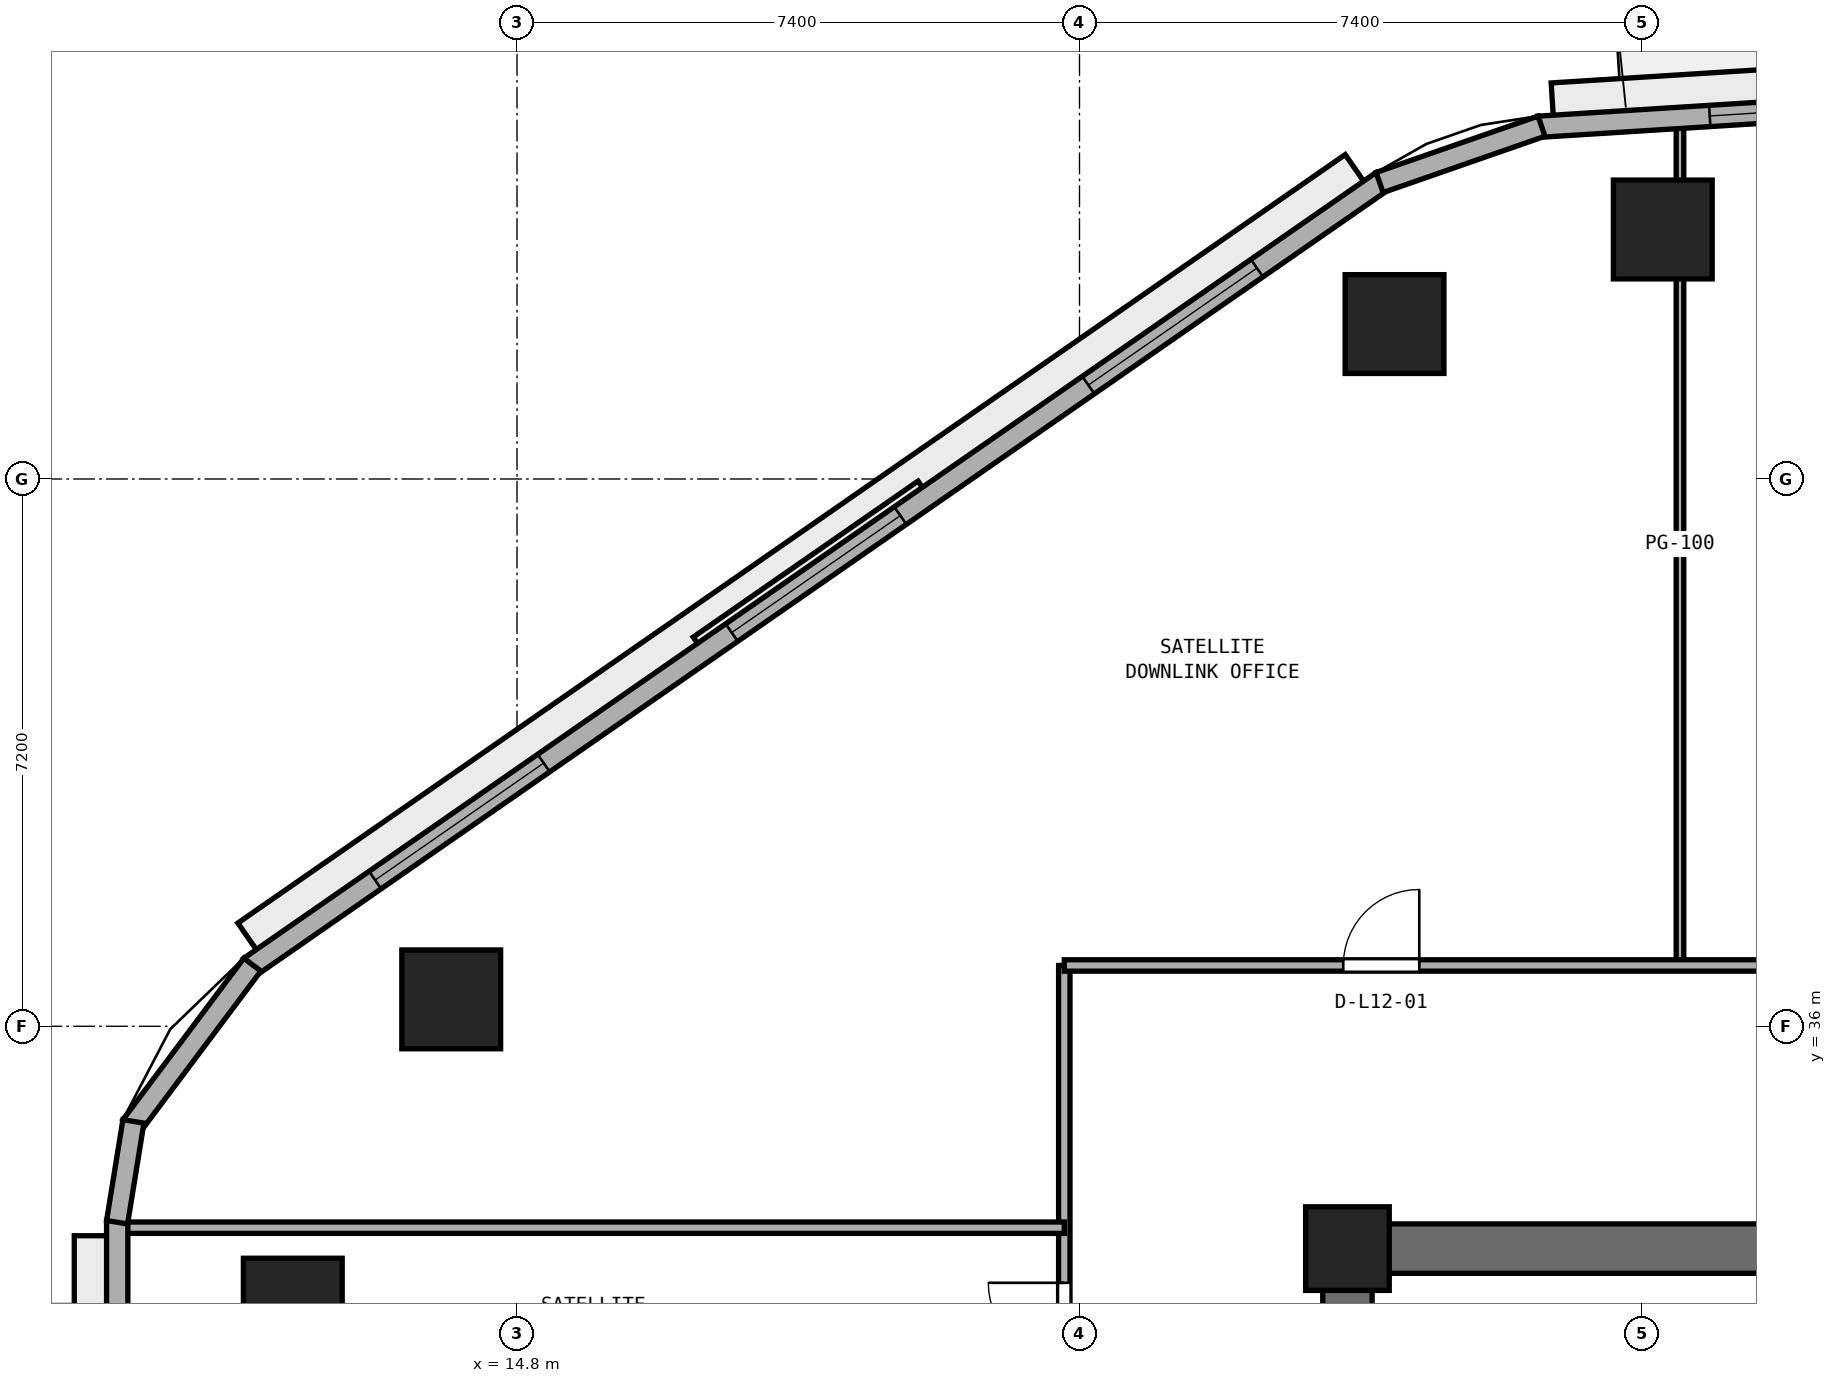
"""IFC4 building model, lengths in metres.
Left out: names, types, materials, properties, quantities, classifications, styles, units other than length and angle.
Written with IfcOpenShell. Run it as: python <this file> out.ifc"""

import sys

from ifc_helpers import new_model, si_unit, direction, frame, frame_2d, origin, origin_2d, place, context, subcontext, project, spatial, rectangle, extrude, element, fill, save


model = new_model("IFC4")
c1 = context("Model", 3, precision=1e-05, world=origin(), true_north=direction((0.0, 1.0)))
c2 = subcontext(c1, "Body", "Model", "MODEL_VIEW")
j1 = project(units=[si_unit("LENGTHUNIT", "METRE"), si_unit("PLANEANGLEUNIT", "RADIAN")], contexts=[c1])
p1 = place(None, origin())
s1 = spatial("IfcSite", under=j1, at=p1, CompositionType="ELEMENT")
p2 = place(p1, origin())
s2 = spatial("IfcBuilding", under=s1, at=p2, CompositionType="ELEMENT")
p3 = place(p2, frame((0.0, 0.0, 51.6)))
s3 = spatial("IfcBuildingStorey", under=s2, at=p3, CompositionType="ELEMENT", Elevation=51.6)
p4 = place(p3, frame((25.4, 33.075, 0.0), z_axis=(0.0, 0.0, 1.0), x_axis=(1.0, 0.0, 0.0)))
e1 = element("IfcWall", 1, at=p4, inside=s3, PredefinedType="SHEAR", context=c2, shape_type="SweptSolid", body=[
    extrude(rectangle(XDim=23.2, YDim=0.65, at=frame_2d((11.6, 0.0))), origin(), (0.0, 0.0, 1.0), 3.525),
])
p5 = place(p3, frame((25.725, 17.65, 0.0), z_axis=(0.0, 0.0, 1.0), x_axis=(0.0, 1.0, 0.0)))
e2 = element("IfcWall", 2, at=p5, inside=s3, PredefinedType="SHEAR", context=c2, shape_type="SweptSolid", body=[
    extrude(rectangle(XDim=15.1, YDim=0.65, at=frame_2d((7.55, 0.0))), origin(), (0.0, 0.0, 1.0), 3.525),
])
p6 = place(p5, frame((6.8, 0.0, 0.0)))
e3 = element("IfcOpeningElement", 3, at=p6, cuts=e2, PredefinedType="OPENING", context=c2, shape_type="SweptSolid", body=[
    extrude(rectangle(XDim=1.5, YDim=2.15, at=frame_2d((0.75, 1.075))), frame((0.0, 0.335, 0.0), z_axis=(0.0, -1.0, 0.0), x_axis=(1.0, 0.0, 0.0)), (0.0, 0.0, 1.0), 0.67),
])
p7 = place(p3, frame((25.725, 33.075, 0.0), z_axis=(0.0, 0.0, 1.0), x_axis=(1.0, 0.0, 0.0)))
e4 = element("IfcColumn", 4, at=p7, inside=s3, PredefinedType="PILASTER", context=c2, shape_type="SweptSolid", body=[
    extrude(rectangle(XDim=1.1, YDim=1.1, at=origin_2d()), origin(), (0.0, 0.0, 1.0), 3.8),
])
for number, where, z_axis, x_axis in (
    (5, (29.874, 46.482, 0.0), (0.0, 0.0, 1.0), (1.0, 0.0, 0.0)),
    (6, (26.344, 45.238, 0.0), (0.0, 0.0, 1.0), (1.0, 0.0, 0.0)),
    (7, (13.934, 36.354, 0.0), (0.0, 0.0, 1.0), (1.0, 0.0, 0.0)),
    (8, (11.85, 32.298, 0.0), (0.0, 0.0, 1.0), (1.0, 0.0, 0.0)),
):
    element("IfcColumn", number, at=place(p3, frame(where, z_axis=z_axis, x_axis=x_axis)), inside=s3, PredefinedType="COLUMN", context=c2, shape_type="SweptSolid", body=[
        extrude(rectangle(XDim=1.3, YDim=1.3, at=origin_2d()), origin(), (0.0, 0.0, 1.0), 3.8),
    ])
p8 = place(p3, frame((30.1, 36.8, 0.0), z_axis=(0.0, 0.0, 1.0), x_axis=(0.0, 1.0, 0.0)))
e9 = element("IfcWall", 9, at=p8, inside=s3, PredefinedType="PARTITIONING", context=c2, shape_type="SweptSolid", body=[
    extrude(rectangle(XDim=11.086, YDim=0.1, at=frame_2d((5.543, 0.0))), origin(), (0.0, 0.0, 1.0), 3.525),
])
p9 = place(p3, frame((22.0, 5.894, 0.0), z_axis=(0.0, 0.0, 1.0), x_axis=(0.0, 1.0, 0.0)))
e10 = element("IfcWall", 10, at=p9, inside=s3, PredefinedType="PARTITIONING", context=c2, shape_type="SweptSolid", body=[
    extrude(rectangle(XDim=30.906, YDim=0.15, at=frame_2d((15.453, 0.0))), origin(), (0.0, 0.0, 1.0), 3.525),
])
p10 = place(p9, frame((12.156, 0.0, 0.0)))
e11 = element("IfcOpeningElement", 11, at=p10, cuts=e10, PredefinedType="OPENING", context=c2, shape_type="SweptSolid", body=[
    extrude(rectangle(XDim=0.9, YDim=2.1, at=frame_2d((0.45, 1.05))), frame((0.0, 0.085, 0.0), z_axis=(0.0, -1.0, 0.0), x_axis=(1.0, 0.0, 0.0)), (0.0, 0.0, 1.0), 0.17),
])
p11 = place(p9, frame((20.806, 0.0, 0.0)))
e12 = element("IfcOpeningElement", 12, at=p11, cuts=e10, PredefinedType="OPENING", context=c2, shape_type="SweptSolid", body=[
    extrude(rectangle(XDim=0.9, YDim=2.1, at=frame_2d((0.45, 1.05))), frame((0.0, 0.085, 0.0), z_axis=(0.0, -1.0, 0.0), x_axis=(1.0, 0.0, 0.0)), (0.0, 0.0, 1.0), 0.17),
])
p12 = place(p9, frame((25.731, 0.0, 0.0)))
e13 = element("IfcOpeningElement", 13, at=p12, cuts=e10, PredefinedType="OPENING", context=c2, shape_type="SweptSolid", body=[
    extrude(rectangle(XDim=1.0, YDim=2.12, at=frame_2d((0.5, 1.06))), frame((0.0, 0.085, 0.0), z_axis=(0.0, -1.0, 0.0), x_axis=(1.0, 0.0, 0.0)), (0.0, 0.0, 1.0), 0.17),
])
p13 = place(p3, frame((9.605, 33.35, 0.0), z_axis=(0.0, 0.0, 1.0), x_axis=(1.0, 0.0, 0.0)))
e14 = element("IfcWall", 14, at=p13, inside=s3, PredefinedType="PARTITIONING", context=c2, shape_type="SweptSolid", body=[
    extrude(rectangle(XDim=12.395, YDim=0.15, at=frame_2d((6.198, 0.0))), origin(), (0.0, 0.0, 1.0), 3.525),
])
p14 = place(p3, frame((22.0, 36.8, 0.0), z_axis=(0.0, 0.0, 1.0), x_axis=(1.0, 0.0, 0.0)))
e15 = element("IfcWall", 15, at=p14, inside=s3, PredefinedType="PARTITIONING", context=c2, shape_type="SweptSolid", body=[
    extrude(rectangle(XDim=30.0, YDim=0.15, at=frame_2d((15.0, 0.0))), origin(), (0.0, 0.0, 1.0), 3.525),
])
p15 = place(p14, frame((3.67, 0.0, 0.0)))
e16 = element("IfcOpeningElement", 16, at=p15, cuts=e15, PredefinedType="OPENING", context=c2, shape_type="SweptSolid", body=[
    extrude(rectangle(XDim=1.0, YDim=2.12, at=frame_2d((0.5, 1.06))), frame((0.0, 0.085, 0.0), z_axis=(0.0, -1.0, 0.0), x_axis=(1.0, 0.0, 0.0)), (0.0, 0.0, 1.0), 0.17),
])
p16 = place(p14, frame((11.9, 0.0, 0.0)))
e17 = element("IfcOpeningElement", 17, at=p16, cuts=e15, PredefinedType="OPENING", context=c2, shape_type="SweptSolid", body=[
    extrude(rectangle(XDim=1.0, YDim=2.12, at=frame_2d((0.5, 1.06))), frame((0.0, 0.085, 0.0), z_axis=(0.0, -1.0, 0.0), x_axis=(1.0, 0.0, 0.0)), (0.0, 0.0, 1.0), 0.17),
])
p17 = place(p14, frame((20.4, 0.0, 0.0)))
e18 = element("IfcOpeningElement", 18, at=p17, cuts=e15, PredefinedType="OPENING", context=c2, shape_type="SweptSolid", body=[
    extrude(rectangle(XDim=1.0, YDim=2.12, at=frame_2d((0.5, 1.06))), frame((0.0, 0.085, 0.0), z_axis=(0.0, -1.0, 0.0), x_axis=(1.0, 0.0, 0.0)), (0.0, 0.0, 1.0), 0.17),
])
p18 = place(p14, frame((26.93, 0.0, 0.0)))
e19 = element("IfcOpeningElement", 19, at=p18, cuts=e15, PredefinedType="OPENING", context=c2, shape_type="SweptSolid", body=[
    extrude(rectangle(XDim=1.0, YDim=2.12, at=frame_2d((0.5, 1.06))), frame((0.0, 0.085, 0.0), z_axis=(0.0, -1.0, 0.0), x_axis=(1.0, 0.0, 0.0)), (0.0, 0.0, 1.0), 0.17),
])
p19 = place(p3, frame((47.832, 49.069, 0.0), z_axis=(0.0, 0.0, 1.0), x_axis=(-0.998017725054, -0.062933460723, 0.0)))
e20 = element("IfcWall", 20, at=p19, inside=s3, PredefinedType="STANDARD", context=c2, shape_type="SweptSolid", body=[
    extrude(rectangle(XDim=19.629, YDim=0.28, at=frame_2d((9.815, 0.0))), origin(), (0.0, 0.0, 1.0), 3.525),
])
p20 = place(p19, frame((9.565, 0.0, 0.0)))
e21 = element("IfcOpeningElement", 21, at=p20, cuts=e20, PredefinedType="OPENING", context=c2, shape_type="SweptSolid", body=[
    extrude(rectangle(XDim=1.1, YDim=2.2, at=frame_2d((0.55, 1.1))), frame((0.0, 0.15, 0.0), z_axis=(0.0, -1.0, 0.0), x_axis=(1.0, 0.0, 0.0)), (0.0, 0.0, 1.0), 0.3),
])
p21 = place(p19, frame((2.255, 0.0, 0.9)))
e22 = element("IfcOpeningElement", 22, at=p21, cuts=e20, PredefinedType="OPENING", context=c2, shape_type="SweptSolid", body=[
    extrude(rectangle(XDim=2.7, YDim=1.75, at=frame_2d((1.35, 0.875))), frame((0.0, 0.15, 0.0), z_axis=(0.0, -1.0, 0.0), x_axis=(1.0, 0.0, 0.0)), (0.0, 0.0, 1.0), 0.3),
])
p22 = place(p19, frame((14.675, 0.0, 0.9)))
e23 = element("IfcOpeningElement", 23, at=p22, cuts=e20, PredefinedType="OPENING", context=c2, shape_type="SweptSolid", body=[
    extrude(rectangle(XDim=2.7, YDim=1.75, at=frame_2d((1.35, 0.875))), frame((0.0, 0.15, 0.0), z_axis=(0.0, -1.0, 0.0), x_axis=(1.0, 0.0, 0.0)), (0.0, 0.0, 1.0), 0.3),
])
p23 = place(p3, frame((26.182, 47.118, 0.0), z_axis=(0.0, 0.0, 1.0), x_axis=(-0.821547956627, -0.570139417127, 0.0)))
e24 = element("IfcWall", 24, at=p23, inside=s3, PredefinedType="STANDARD", context=c2, shape_type="SweptSolid", body=[
    extrude(rectangle(XDim=18.132, YDim=0.28, at=frame_2d((9.066, 0.0))), origin(), (0.0, 0.0, 1.0), 3.525),
])
p24 = place(p23, frame((2.005, 0.0, 0.9)))
e25 = element("IfcOpeningElement", 25, at=p24, cuts=e24, PredefinedType="OPENING", context=c2, shape_type="SweptSolid", body=[
    extrude(rectangle(XDim=2.7, YDim=1.75, at=frame_2d((1.35, 0.875))), frame((0.0, 0.15, 0.0), z_axis=(0.0, -1.0, 0.0), x_axis=(1.0, 0.0, 0.0)), (0.0, 0.0, 1.0), 0.3),
])
p25 = place(p23, frame((7.716, 0.0, 0.9)))
e26 = element("IfcOpeningElement", 26, at=p25, cuts=e24, PredefinedType="OPENING", context=c2, shape_type="SweptSolid", body=[
    extrude(rectangle(XDim=2.7, YDim=1.75, at=frame_2d((1.35, 0.875))), frame((0.0, 0.15, 0.0), z_axis=(0.0, -1.0, 0.0), x_axis=(1.0, 0.0, 0.0)), (0.0, 0.0, 1.0), 0.3),
])
p26 = place(p23, frame((13.427, 0.0, 0.9)))
e27 = element("IfcOpeningElement", 27, at=p26, cuts=e24, PredefinedType="OPENING", context=c2, shape_type="SweptSolid", body=[
    extrude(rectangle(XDim=2.7, YDim=1.75, at=frame_2d((1.35, 0.875))), frame((0.0, 0.15, 0.0), z_axis=(0.0, -1.0, 0.0), x_axis=(1.0, 0.0, 0.0)), (0.0, 0.0, 1.0), 0.3),
])
p27 = place(p3, frame((9.54, 33.444, 0.0), z_axis=(0.0, 0.0, 1.0), x_axis=(0.0, -1.0, 0.0)))
e28 = element("IfcWall", 28, at=p27, inside=s3, PredefinedType="STANDARD", context=c2, shape_type="SweptSolid", body=[
    extrude(rectangle(XDim=17.301, YDim=0.28, at=frame_2d((8.65, 0.0))), origin(), (0.0, 0.0, 1.0), 3.525),
])
p28 = place(p27, frame((8.1, 0.0, 0.0)))
e29 = element("IfcOpeningElement", 29, at=p28, cuts=e28, PredefinedType="OPENING", context=c2, shape_type="SweptSolid", body=[
    extrude(rectangle(XDim=1.1, YDim=2.2, at=frame_2d((0.55, 1.1))), frame((0.0, 0.15, 0.0), z_axis=(0.0, -1.0, 0.0), x_axis=(1.0, 0.0, 0.0)), (0.0, 0.0, 1.0), 0.3),
])
p29 = place(p27, frame((12.734, 0.0, 0.9)))
e30 = element("IfcOpeningElement", 30, at=p29, cuts=e28, PredefinedType="OPENING", context=c2, shape_type="SweptSolid", body=[
    extrude(rectangle(XDim=2.7, YDim=1.75, at=frame_2d((1.35, 0.875))), frame((0.0, 0.15, 0.0), z_axis=(0.0, -1.0, 0.0), x_axis=(1.0, 0.0, 0.0)), (0.0, 0.0, 1.0), 0.3),
])
p30 = place(p3, frame((28.278, 47.842, 0.0), z_axis=(0.0, 0.0, 1.0), x_axis=(-0.9444559001, -0.328638179106, 0.0)))
e31 = element("IfcWall", 31, at=p30, inside=s3, PredefinedType="STANDARD", context=c2, shape_type="SweptSolid", body=[
    extrude(rectangle(XDim=2.255, YDim=0.28, at=frame_2d((1.128, 0.0))), origin(), (0.0, 0.0, 1.0), 3.525),
])
p31 = place(p3, frame((11.318, 36.811, 0.0), z_axis=(0.0, 0.0, 1.0), x_axis=(-0.599455152629, -0.800408345775, 0.0)))
e32 = element("IfcWall", 32, at=p31, inside=s3, PredefinedType="STANDARD", context=c2, shape_type="SweptSolid", body=[
    extrude(rectangle(XDim=2.653, YDim=0.28, at=frame_2d((1.327, 0.0))), origin(), (0.0, 0.0, 1.0), 3.525),
])
p32 = place(p3, frame((9.753, 34.749, 0.0), z_axis=(0.0, 0.0, 1.0), x_axis=(-0.160037671962, -0.987110907423, 0.0)))
e33 = element("IfcWall", 33, at=p32, inside=s3, PredefinedType="STANDARD", context=c2, shape_type="SweptSolid", body=[
    extrude(rectangle(XDim=1.344, YDim=0.28, at=frame_2d((0.672, 0.0))), origin(), (0.0, 0.0, 1.0), 3.525),
])
p33 = place(p15, origin())
e34 = element("IfcDoor", 34, at=p33, inside=s3, OperationType="SINGLE_SWING_RIGHT", PredefinedType="DOOR", context=c2, shape_type="SweptSolid", body=[
    extrude(rectangle(XDim=1.0, YDim=2.12, at=frame_2d((0.5, 1.06))), frame((0.0, 0.025, 0.0), z_axis=(0.0, -1.0, 0.0), x_axis=(1.0, 0.0, 0.0)), (0.0, 0.0, 1.0), 0.05),
])
fill(e16, e34)
p34 = place(p12, origin())
e35 = element("IfcDoor", 35, at=p34, inside=s3, OperationType="SINGLE_SWING_RIGHT", PredefinedType="DOOR", context=c2, shape_type="SweptSolid", body=[
    extrude(rectangle(XDim=1.0, YDim=2.12, at=frame_2d((0.5, 1.06))), frame((0.0, 0.025, 0.0), z_axis=(0.0, -1.0, 0.0), x_axis=(1.0, 0.0, 0.0)), (0.0, 0.0, 1.0), 0.05),
])
fill(e13, e35)
p35 = place(p22, origin())
e36 = element("IfcWindow", 36, at=p35, inside=s3, PartitioningType="SINGLE_PANEL", PredefinedType="WINDOW", context=c2, shape_type="SweptSolid", body=[
    extrude(rectangle(XDim=2.7, YDim=1.75, at=frame_2d((1.35, 0.875))), frame((0.0, 0.03, 0.0), z_axis=(0.0, -1.0, 0.0), x_axis=(1.0, 0.0, 0.0)), (0.0, 0.0, 1.0), 0.06),
])
fill(e23, e36)
p36 = place(p24, origin())
e37 = element("IfcWindow", 37, at=p36, inside=s3, PartitioningType="SINGLE_PANEL", PredefinedType="WINDOW", context=c2, shape_type="SweptSolid", body=[
    extrude(rectangle(XDim=2.7, YDim=1.75, at=frame_2d((1.35, 0.875))), frame((0.0, 0.03, 0.0), z_axis=(0.0, -1.0, 0.0), x_axis=(1.0, 0.0, 0.0)), (0.0, 0.0, 1.0), 0.06),
])
fill(e25, e37)
p37 = place(p25, origin())
e38 = element("IfcWindow", 38, at=p37, inside=s3, PartitioningType="SINGLE_PANEL", PredefinedType="WINDOW", context=c2, shape_type="SweptSolid", body=[
    extrude(rectangle(XDim=2.7, YDim=1.75, at=frame_2d((1.35, 0.875))), frame((0.0, 0.03, 0.0), z_axis=(0.0, -1.0, 0.0), x_axis=(1.0, 0.0, 0.0)), (0.0, 0.0, 1.0), 0.06),
])
fill(e26, e38)
p38 = place(p26, origin())
e39 = element("IfcWindow", 39, at=p38, inside=s3, PartitioningType="SINGLE_PANEL", PredefinedType="WINDOW", context=c2, shape_type="SweptSolid", body=[
    extrude(rectangle(XDim=2.7, YDim=1.75, at=frame_2d((1.35, 0.875))), frame((0.0, 0.03, 0.0), z_axis=(0.0, -1.0, 0.0), x_axis=(1.0, 0.0, 0.0)), (0.0, 0.0, 1.0), 0.06),
])
fill(e27, e39)
save(model, sys.argv[1])
